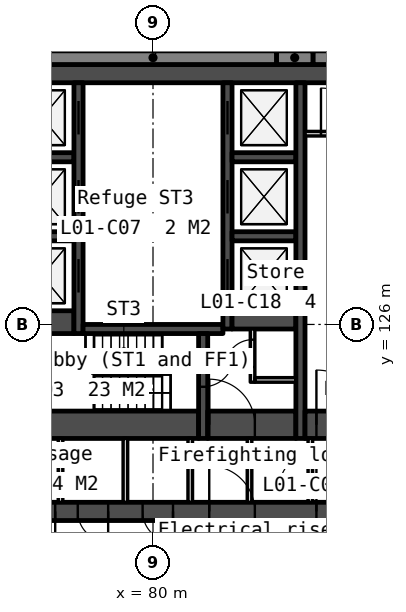
"""IFC4 building model, lengths in metres.
Left out: names, types, materials, properties, quantities, classifications, styles, units other than length and angle.
Written with IfcOpenShell. Run it as: python <this file> out.ifc"""

import sys

from ifc_helpers import new_model, si_unit, direction, frame, frame_2d, origin, place, context, subcontext, project, spatial, rectangle, extrude, element, fill, save


model = new_model("IFC4")
c1 = context("Model", 3, precision=1e-05, world=origin(), true_north=direction((0.0, 1.0)))
c2 = subcontext(c1, "Body", "Model", "MODEL_VIEW")
j1 = project(units=[si_unit("LENGTHUNIT", "METRE"), si_unit("PLANEANGLEUNIT", "RADIAN")], contexts=[c1])
p1 = place(None, origin())
s1 = spatial("IfcSite", under=j1, at=p1, CompositionType="ELEMENT")
p2 = place(p1, origin())
s2 = spatial("IfcBuilding", under=s1, at=p2, CompositionType="ELEMENT")
p3 = place(p2, frame((0.0, 0.0, 7.5)))
s3 = spatial("IfcBuildingStorey", under=s2, at=p3, CompositionType="ELEMENT", Elevation=7.5)
p4 = place(p3, frame((66.0, 134.25, 0.0), z_axis=(0.0, 0.0, 1.0), x_axis=(1.0, 0.0, 0.0)))
e1 = element("IfcWall", 1, at=p4, inside=s3, PredefinedType="SOLIDWALL", context=c2, shape_type="SweptSolid", body=[
    extrude(rectangle(XDim=28.0, YDim=0.6, at=frame_2d((14.0, 0.0))), origin(), (0.0, 0.0, 1.0), 5.7),
])
p5 = place(p3, frame((66.0, 119.85, 0.0), z_axis=(0.0, 0.0, 1.0), x_axis=(1.0, 0.0, 0.0)))
e2 = element("IfcWall", 2, at=p5, inside=s3, PredefinedType="SOLIDWALL", context=c2, shape_type="SweptSolid", body=[
    extrude(rectangle(XDim=28.0, YDim=0.6, at=frame_2d((14.0, 0.0))), origin(), (0.0, 0.0, 1.0), 5.7),
])
p6 = place(p5, frame((6.825, 0.0, 0.0)))
e3 = element("IfcOpeningElement", 3, at=p6, cuts=e2, PredefinedType="OPENING", context=c2, shape_type="SweptSolid", body=[
    extrude(rectangle(XDim=1.8, YDim=2.1, at=frame_2d((0.9, 1.05))), frame((0.0, 0.31, 0.0), z_axis=(0.0, -1.0, 0.0), x_axis=(1.0, 0.0, 0.0)), (0.0, 0.0, 1.0), 0.62),
])
p7 = place(p5, frame((15.85, 0.0, 0.0)))
e4 = element("IfcOpeningElement", 4, at=p7, cuts=e2, PredefinedType="OPENING", context=c2, shape_type="SweptSolid", body=[
    extrude(rectangle(XDim=1.5, YDim=2.1, at=frame_2d((0.75, 1.05))), frame((0.0, 0.31, 0.0), z_axis=(0.0, -1.0, 0.0), x_axis=(1.0, 0.0, 0.0)), (0.0, 0.0, 1.0), 0.62),
])
p8 = place(p5, frame((19.375, 0.0, 0.0)))
e5 = element("IfcOpeningElement", 5, at=p8, cuts=e2, PredefinedType="OPENING", context=c2, shape_type="SweptSolid", body=[
    extrude(rectangle(XDim=1.8, YDim=2.1, at=frame_2d((0.9, 1.05))), frame((0.0, 0.31, 0.0), z_axis=(0.0, -1.0, 0.0), x_axis=(1.0, 0.0, 0.0)), (0.0, 0.0, 1.0), 0.62),
])
p9 = place(p5, frame((4.425, 0.0, 0.0)))
e6 = element("IfcOpeningElement", 6, at=p9, cuts=e2, PredefinedType="OPENING", context=c2, shape_type="SweptSolid", body=[
    extrude(rectangle(XDim=1.0, YDim=2.1, at=frame_2d((0.5, 1.05))), frame((0.0, 0.31, 0.0), z_axis=(0.0, -1.0, 0.0), x_axis=(1.0, 0.0, 0.0)), (0.0, 0.0, 1.0), 0.62),
])
p10 = place(p5, frame((9.783, 0.0, 0.0)))
e7 = element("IfcOpeningElement", 7, at=p10, cuts=e2, PredefinedType="OPENING", context=c2, shape_type="SweptSolid", body=[
    extrude(rectangle(XDim=1.0, YDim=2.1, at=frame_2d((0.5, 1.05))), frame((0.0, 0.31, 0.0), z_axis=(0.0, -1.0, 0.0), x_axis=(1.0, 0.0, 0.0)), (0.0, 0.0, 1.0), 0.62),
])
p11 = place(p5, frame((11.525, 0.0, 0.0)))
e8 = element("IfcOpeningElement", 8, at=p11, cuts=e2, PredefinedType="OPENING", context=c2, shape_type="SweptSolid", body=[
    extrude(rectangle(XDim=1.0, YDim=2.1, at=frame_2d((0.5, 1.05))), frame((0.0, 0.31, 0.0), z_axis=(0.0, -1.0, 0.0), x_axis=(1.0, 0.0, 0.0)), (0.0, 0.0, 1.0), 0.62),
])
p12 = place(p5, frame((13.658, 0.0, 0.0)))
e9 = element("IfcOpeningElement", 9, at=p12, cuts=e2, PredefinedType="OPENING", context=c2, shape_type="SweptSolid", body=[
    extrude(rectangle(XDim=1.0, YDim=2.1, at=frame_2d((0.5, 1.05))), frame((0.0, 0.31, 0.0), z_axis=(0.0, -1.0, 0.0), x_axis=(1.0, 0.0, 0.0)), (0.0, 0.0, 1.0), 0.62),
])
p13 = place(p5, frame((21.725, 0.0, 0.0)))
e10 = element("IfcOpeningElement", 10, at=p13, cuts=e2, PredefinedType="OPENING", context=c2, shape_type="SweptSolid", body=[
    extrude(rectangle(XDim=1.0, YDim=2.1, at=frame_2d((0.5, 1.05))), frame((0.0, 0.31, 0.0), z_axis=(0.0, -1.0, 0.0), x_axis=(1.0, 0.0, 0.0)), (0.0, 0.0, 1.0), 0.62),
])
p14 = place(p5, frame((23.425, 0.0, 0.0)))
e11 = element("IfcOpeningElement", 11, at=p14, cuts=e2, PredefinedType="OPENING", context=c2, shape_type="SweptSolid", body=[
    extrude(rectangle(XDim=1.0, YDim=2.1, at=frame_2d((0.5, 1.05))), frame((0.0, 0.31, 0.0), z_axis=(0.0, -1.0, 0.0), x_axis=(1.0, 0.0, 0.0)), (0.0, 0.0, 1.0), 0.62),
])
for number, where, z_axis, x_axis in (
    (12, (75.3, 131.5, 0.0), (0.0, 0.0, 1.0), (1.0, 0.0, 0.0)),
    (13, (75.3, 128.9, 0.0), (0.0, 0.0, 1.0), (1.0, 0.0, 0.0)),
):
    element("IfcWall", number, at=place(p3, frame(where, z_axis=z_axis, x_axis=x_axis)), inside=s3, PredefinedType="SOLIDWALL", context=c2, shape_type="SweptSolid", body=[
        extrude(rectangle(XDim=2.1, YDim=0.3, at=frame_2d((1.05, 0.0))), origin(), (0.0, 0.0, 1.0), 5.7),
    ])
p15 = place(p3, frame((75.3, 126.075, 0.0), z_axis=(0.0, 0.0, 1.0), x_axis=(1.0, 0.0, 0.0)))
e14 = element("IfcWall", 14, at=p15, inside=s3, PredefinedType="SOLIDWALL", context=c2, shape_type="SweptSolid", body=[
    extrude(rectangle(XDim=2.1, YDim=0.75, at=frame_2d((1.05, 0.0))), origin(), (0.0, 0.0, 1.0), 5.7),
])
p16 = place(p3, frame((75.3, 122.7, 0.0), z_axis=(0.0, 0.0, 1.0), x_axis=(1.0, 0.0, 0.0)))
e15 = element("IfcWall", 15, at=p16, inside=s3, PredefinedType="SOLIDWALL", context=c2, shape_type="SweptSolid", body=[
    extrude(rectangle(XDim=6.2, YDim=0.9, at=frame_2d((3.1, 0.0))), origin(), (0.0, 0.0, 1.0), 5.7),
])
p17 = place(p3, frame((76.958, 122.25, 0.0), z_axis=(0.0, 0.0, 1.0), x_axis=(0.0, -1.0, 0.0)))
e16 = element("IfcWall", 16, at=p17, inside=s3, PredefinedType="PARTITIONING", context=c2, shape_type="SweptSolid", body=[
    extrude(rectangle(XDim=2.1, YDim=0.15, at=frame_2d((1.05, 0.0))), origin(), (0.0, 0.0, 1.0), 5.7),
])
p18 = place(p3, frame((77.55, 133.95, 0.0), z_axis=(0.0, 0.0, 1.0), x_axis=(0.0, -1.0, 0.0)))
e17 = element("IfcWall", 17, at=p18, inside=s3, PredefinedType="SOLIDWALL", context=c2, shape_type="SweptSolid", body=[
    extrude(rectangle(XDim=8.25, YDim=0.3, at=frame_2d((4.125, 0.0))), origin(), (0.0, 0.0, 1.0), 5.7),
])
p19 = place(p18, frame((0.6, 0.0, 0.0)))
e18 = element("IfcOpeningElement", 18, at=p19, cuts=e17, PredefinedType="OPENING", context=c2, shape_type="SweptSolid", body=[
    extrude(rectangle(XDim=1.1, YDim=2.1, at=frame_2d((0.55, 1.05))), frame((0.0, 0.16, 0.0), z_axis=(0.0, -1.0, 0.0), x_axis=(1.0, 0.0, 0.0)), (0.0, 0.0, 1.0), 0.32),
])
p20 = place(p18, frame((3.2, 0.0, 0.0)))
e19 = element("IfcOpeningElement", 19, at=p20, cuts=e17, PredefinedType="OPENING", context=c2, shape_type="SweptSolid", body=[
    extrude(rectangle(XDim=1.1, YDim=2.1, at=frame_2d((0.55, 1.05))), frame((0.0, 0.16, 0.0), z_axis=(0.0, -1.0, 0.0), x_axis=(1.0, 0.0, 0.0)), (0.0, 0.0, 1.0), 0.32),
])
p21 = place(p18, frame((5.8, 0.0, 0.0)))
e20 = element("IfcOpeningElement", 20, at=p21, cuts=e17, PredefinedType="OPENING", context=c2, shape_type="SweptSolid", body=[
    extrude(rectangle(XDim=1.1, YDim=2.1, at=frame_2d((0.55, 1.05))), frame((0.0, 0.16, 0.0), z_axis=(0.0, -1.0, 0.0), x_axis=(1.0, 0.0, 0.0)), (0.0, 0.0, 1.0), 0.32),
])
p22 = place(p3, frame((77.7, 125.85, 0.0), z_axis=(0.0, 0.0, 1.0), x_axis=(1.0, 0.0, 0.0)))
e21 = element("IfcWall", 21, at=p22, inside=s3, PredefinedType="SOLIDWALL", context=c2, shape_type="SweptSolid", body=[
    extrude(rectangle(XDim=4.6, YDim=0.3, at=frame_2d((2.3, 0.0))), origin(), (0.0, 0.0, 1.0), 5.7),
])
for number, where, z_axis, x_axis in (
    (22, (79.092, 122.25, 0.0), (0.0, 0.0, 1.0), (0.0, -1.0, 0.0)),
    (23, (81.225, 122.25, 0.0), (0.0, 0.0, 1.0), (0.0, -1.0, 0.0)),
):
    element("IfcWall", number, at=place(p3, frame(where, z_axis=z_axis, x_axis=x_axis)), inside=s3, PredefinedType="PARTITIONING", context=c2, shape_type="SweptSolid", body=[
        extrude(rectangle(XDim=2.1, YDim=0.15, at=frame_2d((1.05, 0.0))), origin(), (0.0, 0.0, 1.0), 5.7),
    ])
p23 = place(p3, frame((81.65, 125.7, 0.0), z_axis=(0.0, 0.0, 1.0), x_axis=(0.0, -1.0, 0.0)))
e24 = element("IfcWall", 24, at=p23, inside=s3, PredefinedType="SOLIDWALL", context=c2, shape_type="SweptSolid", body=[
    extrude(rectangle(XDim=3.45, YDim=0.3, at=frame_2d((1.725, 0.0))), origin(), (0.0, 0.0, 1.0), 5.7),
])
p24 = place(p23, frame((0.75, 0.0, 0.0)))
e25 = element("IfcOpeningElement", 25, at=p24, cuts=e24, PredefinedType="OPENING", context=c2, shape_type="SweptSolid", body=[
    extrude(rectangle(XDim=1.0, YDim=2.1, at=frame_2d((0.5, 1.05))), frame((0.0, 0.16, 0.0), z_axis=(0.0, -1.0, 0.0), x_axis=(1.0, 0.0, 0.0)), (0.0, 0.0, 1.0), 0.32),
])
p25 = place(p3, frame((81.8, 122.7, 0.0), z_axis=(0.0, 0.0, 1.0), x_axis=(1.0, 0.0, 0.0)))
e26 = element("IfcWall", 26, at=p25, inside=s3, PredefinedType="SOLIDWALL", context=c2, shape_type="SweptSolid", body=[
    extrude(rectangle(XDim=2.9, YDim=0.9, at=frame_2d((1.45, 0.0))), origin(), (0.0, 0.0, 1.0), 5.7),
])
p26 = place(p25, frame((0.05, 0.0, 0.0)))
e27 = element("IfcOpeningElement", 27, at=p26, cuts=e26, PredefinedType="OPENING", context=c2, shape_type="SweptSolid", body=[
    extrude(rectangle(XDim=1.5, YDim=2.1, at=frame_2d((0.75, 1.05))), frame((0.0, 0.46, 0.0), z_axis=(0.0, -1.0, 0.0), x_axis=(1.0, 0.0, 0.0)), (0.0, 0.0, 1.0), 0.92),
])
p27 = place(p3, frame((82.45, 133.95, 0.0), z_axis=(0.0, 0.0, 1.0), x_axis=(0.0, -1.0, 0.0)))
e28 = element("IfcWall", 28, at=p27, inside=s3, PredefinedType="SOLIDWALL", context=c2, shape_type="SweptSolid", body=[
    extrude(rectangle(XDim=8.1, YDim=0.3, at=frame_2d((4.05, 0.0))), origin(), (0.0, 0.0, 1.0), 5.7),
])
p28 = place(p27, frame((0.6, 0.0, 0.0)))
e29 = element("IfcOpeningElement", 29, at=p28, cuts=e28, PredefinedType="OPENING", context=c2, shape_type="SweptSolid", body=[
    extrude(rectangle(XDim=1.1, YDim=2.1, at=frame_2d((0.55, 1.05))), frame((0.0, 0.16, 0.0), z_axis=(0.0, -1.0, 0.0), x_axis=(1.0, 0.0, 0.0)), (0.0, 0.0, 1.0), 0.32),
])
p29 = place(p27, frame((3.2, 0.0, 0.0)))
e30 = element("IfcOpeningElement", 30, at=p29, cuts=e28, PredefinedType="OPENING", context=c2, shape_type="SweptSolid", body=[
    extrude(rectangle(XDim=1.1, YDim=2.1, at=frame_2d((0.55, 1.05))), frame((0.0, 0.16, 0.0), z_axis=(0.0, -1.0, 0.0), x_axis=(1.0, 0.0, 0.0)), (0.0, 0.0, 1.0), 0.32),
])
p30 = place(p27, frame((5.8, 0.0, 0.0)))
e31 = element("IfcOpeningElement", 31, at=p30, cuts=e28, PredefinedType="OPENING", context=c2, shape_type="SweptSolid", body=[
    extrude(rectangle(XDim=1.1, YDim=2.1, at=frame_2d((0.55, 1.05))), frame((0.0, 0.16, 0.0), z_axis=(0.0, -1.0, 0.0), x_axis=(1.0, 0.0, 0.0)), (0.0, 0.0, 1.0), 0.32),
])
for number, where, z_axis, x_axis in (
    (32, (82.6, 131.5, 0.0), (0.0, 0.0, 1.0), (1.0, 0.0, 0.0)),
    (33, (82.6, 128.9, 0.0), (0.0, 0.0, 1.0), (1.0, 0.0, 0.0)),
):
    element("IfcWall", number, at=place(p3, frame(where, z_axis=z_axis, x_axis=x_axis)), inside=s3, PredefinedType="SOLIDWALL", context=c2, shape_type="SweptSolid", body=[
        extrude(rectangle(XDim=2.1, YDim=0.3, at=frame_2d((1.05, 0.0))), origin(), (0.0, 0.0, 1.0), 5.7),
    ])
p31 = place(p3, frame((82.6, 126.15, 0.0), z_axis=(0.0, 0.0, 1.0), x_axis=(1.0, 0.0, 0.0)))
e34 = element("IfcWall", 34, at=p31, inside=s3, PredefinedType="SOLIDWALL", context=c2, shape_type="SweptSolid", body=[
    extrude(rectangle(XDim=2.1, YDim=0.6, at=frame_2d((1.05, 0.0))), origin(), (0.0, 0.0, 1.0), 5.7),
])
p32 = place(p3, frame((83.175, 122.25, 0.0), z_axis=(0.0, 0.0, 1.0), x_axis=(0.0, -1.0, 0.0)))
e35 = element("IfcWall", 35, at=p32, inside=s3, PredefinedType="PARTITIONING", context=c2, shape_type="SweptSolid", body=[
    extrude(rectangle(XDim=2.1, YDim=0.15, at=frame_2d((1.05, 0.0))), origin(), (0.0, 0.0, 1.0), 5.7),
])
p33 = place(p3, frame((83.275, 125.85, 0.0), z_axis=(0.0, 0.0, 1.0), x_axis=(0.0, -1.0, 0.0)))
e36 = element("IfcWall", 36, at=p33, inside=s3, PredefinedType="PARTITIONING", context=c2, shape_type="SweptSolid", body=[
    extrude(rectangle(XDim=1.75, YDim=0.15, at=frame_2d((0.875, 0.0))), origin(), (0.0, 0.0, 1.0), 5.7),
])
p34 = place(p33, frame((0.35, 0.0, 0.0)))
e37 = element("IfcOpeningElement", 37, at=p34, cuts=e36, PredefinedType="OPENING", context=c2, shape_type="SweptSolid", body=[
    extrude(rectangle(XDim=0.9, YDim=2.1, at=frame_2d((0.45, 1.05))), frame((0.0, 0.085, 0.0), z_axis=(0.0, -1.0, 0.0), x_axis=(1.0, 0.0, 0.0)), (0.0, 0.0, 1.0), 0.17),
])
p35 = place(p3, frame((83.35, 124.175, 0.0), z_axis=(0.0, 0.0, 1.0), x_axis=(1.0, 0.0, 0.0)))
e38 = element("IfcWall", 38, at=p35, inside=s3, PredefinedType="PARTITIONING", context=c2, shape_type="SweptSolid", body=[
    extrude(rectangle(XDim=1.35, YDim=0.15, at=frame_2d((0.675, 0.0))), origin(), (0.0, 0.0, 1.0), 5.7),
])
p36 = place(p3, frame((84.85, 133.95, 0.0), z_axis=(0.0, 0.0, 1.0), x_axis=(0.0, -1.0, 0.0)))
e39 = element("IfcWall", 39, at=p36, inside=s3, PredefinedType="SOLIDWALL", context=c2, shape_type="SweptSolid", body=[
    extrude(rectangle(XDim=11.7, YDim=0.3, at=frame_2d((5.85, 0.0))), origin(), (0.0, 0.0, 1.0), 5.7),
])
p37 = place(p3, frame((85.0, 132.275, 0.0), z_axis=(0.0, 0.0, 1.0), x_axis=(1.0, 0.0, 0.0)))
e40 = element("IfcWall", 40, at=p37, inside=s3, PredefinedType="PARTITIONING", context=c2, shape_type="SweptSolid", body=[
    extrude(rectangle(XDim=2.55, YDim=0.15, at=frame_2d((1.275, 0.0))), origin(), (0.0, 0.0, 1.0), 5.7),
])
p38 = place(p37, frame((0.525, 0.0, 0.0)))
e41 = element("IfcOpeningElement", 41, at=p38, cuts=e40, PredefinedType="OPENING", context=c2, shape_type="SweptSolid", body=[
    extrude(rectangle(XDim=1.5, YDim=2.1, at=frame_2d((0.75, 1.05))), frame((0.0, 0.085, 0.0), z_axis=(0.0, -1.0, 0.0), x_axis=(1.0, 0.0, 0.0)), (0.0, 0.0, 1.0), 0.17),
])
p39 = place(p3, frame((85.0, 122.7, 0.0), z_axis=(0.0, 0.0, 1.0), x_axis=(1.0, 0.0, 0.0)))
e42 = element("IfcWall", 42, at=p39, inside=s3, PredefinedType="SOLIDWALL", context=c2, shape_type="SweptSolid", body=[
    extrude(rectangle(XDim=2.55, YDim=0.9, at=frame_2d((1.275, 0.0))), origin(), (0.0, 0.0, 1.0), 5.7),
])
p40 = place(p39, frame((0.375, 0.0, 0.0)))
e43 = element("IfcOpeningElement", 43, at=p40, cuts=e42, PredefinedType="OPENING", context=c2, shape_type="SweptSolid", body=[
    extrude(rectangle(XDim=1.8, YDim=2.1, at=frame_2d((0.9, 1.05))), frame((0.0, 0.46, 0.0), z_axis=(0.0, -1.0, 0.0), x_axis=(1.0, 0.0, 0.0)), (0.0, 0.0, 1.0), 0.92),
])
p41 = place(p3, frame((85.175, 122.25, 0.0), z_axis=(0.0, 0.0, 1.0), x_axis=(0.0, -1.0, 0.0)))
e44 = element("IfcWall", 44, at=p41, inside=s3, PredefinedType="PARTITIONING", context=c2, shape_type="SweptSolid", body=[
    extrude(rectangle(XDim=2.1, YDim=0.15, at=frame_2d((1.05, 0.0))), origin(), (0.0, 0.0, 1.0), 5.7),
])
p42 = place(p41, frame((0.55, 0.0, 0.0)))
e45 = element("IfcOpeningElement", 45, at=p42, cuts=e44, PredefinedType="OPENING", context=c2, shape_type="SweptSolid", body=[
    extrude(rectangle(XDim=1.0, YDim=2.1, at=frame_2d((0.5, 1.05))), frame((0.0, 0.085, 0.0), z_axis=(0.0, -1.0, 0.0), x_axis=(1.0, 0.0, 0.0)), (0.0, 0.0, 1.0), 0.17),
])
p43 = place(p3, frame((93.382, 134.775, -0.3), z_axis=(0.0, 0.0, 1.0), x_axis=(-1.0, 0.0, 0.0)))
e46 = element("IfcWall", 46, at=p43, inside=s3, PredefinedType="SOLIDWALL", context=c2, shape_type="SweptSolid", body=[
    extrude(rectangle(XDim=8.121, YDim=0.45, at=frame_2d((4.061, 0.0))), origin(), (0.0, 0.0, 1.0), 5.312),
])
p44 = place(p3, frame((85.261, 134.775, -0.3), z_axis=(0.0, 0.0, 1.0), x_axis=(-1.0, 0.0, 0.0)))
e47 = element("IfcWall", 47, at=p44, inside=s3, PredefinedType="SOLIDWALL", context=c2, shape_type="SweptSolid", body=[
    extrude(rectangle(XDim=1.2, YDim=0.45, at=frame_2d((0.6, 0.0))), origin(), (0.0, 0.0, 1.0), 5.312),
])
p45 = place(p3, frame((84.061, 134.775, -0.3), z_axis=(0.0, 0.0, 1.0), x_axis=(-1.0, 0.0, 0.0)))
e48 = element("IfcWall", 48, at=p45, inside=s3, PredefinedType="SOLIDWALL", context=c2, shape_type="SweptSolid", body=[
    extrude(rectangle(XDim=8.122, YDim=0.45, at=frame_2d((4.061, 0.0))), origin(), (0.0, 0.0, 1.0), 5.312),
])
p46 = place(p19, origin())
e49 = element("IfcDoor", 49, at=p46, inside=s3, OperationType="SLIDING_TO_RIGHT", PredefinedType="DOOR", context=c2, shape_type="SweptSolid", body=[
    extrude(rectangle(XDim=1.1, YDim=2.1, at=frame_2d((0.55, 1.05))), frame((0.0, 0.025, 0.0), z_axis=(0.0, -1.0, 0.0), x_axis=(1.0, 0.0, 0.0)), (0.0, 0.0, 1.0), 0.05),
])
fill(e18, e49)
p47 = place(p20, origin())
e50 = element("IfcDoor", 50, at=p47, inside=s3, OperationType="SLIDING_TO_RIGHT", PredefinedType="DOOR", context=c2, shape_type="SweptSolid", body=[
    extrude(rectangle(XDim=1.1, YDim=2.1, at=frame_2d((0.55, 1.05))), frame((0.0, 0.025, 0.0), z_axis=(0.0, -1.0, 0.0), x_axis=(1.0, 0.0, 0.0)), (0.0, 0.0, 1.0), 0.05),
])
fill(e19, e50)
p48 = place(p21, origin())
e51 = element("IfcDoor", 51, at=p48, inside=s3, OperationType="SLIDING_TO_RIGHT", PredefinedType="DOOR", context=c2, shape_type="SweptSolid", body=[
    extrude(rectangle(XDim=1.1, YDim=2.1, at=frame_2d((0.55, 1.05))), frame((0.0, 0.025, 0.0), z_axis=(0.0, -1.0, 0.0), x_axis=(1.0, 0.0, 0.0)), (0.0, 0.0, 1.0), 0.05),
])
fill(e20, e51)
p49 = place(p28, origin())
e52 = element("IfcDoor", 52, at=p49, inside=s3, OperationType="SLIDING_TO_LEFT", PredefinedType="DOOR", context=c2, shape_type="SweptSolid", body=[
    extrude(rectangle(XDim=1.1, YDim=2.1, at=frame_2d((0.55, 1.05))), frame((0.0, 0.025, 0.0), z_axis=(0.0, -1.0, 0.0), x_axis=(1.0, 0.0, 0.0)), (0.0, 0.0, 1.0), 0.05),
])
fill(e29, e52)
p50 = place(p29, origin())
e53 = element("IfcDoor", 53, at=p50, inside=s3, OperationType="SLIDING_TO_LEFT", PredefinedType="DOOR", context=c2, shape_type="SweptSolid", body=[
    extrude(rectangle(XDim=1.1, YDim=2.1, at=frame_2d((0.55, 1.05))), frame((0.0, 0.025, 0.0), z_axis=(0.0, -1.0, 0.0), x_axis=(1.0, 0.0, 0.0)), (0.0, 0.0, 1.0), 0.05),
])
fill(e30, e53)
p51 = place(p30, origin())
e54 = element("IfcDoor", 54, at=p51, inside=s3, OperationType="SLIDING_TO_LEFT", PredefinedType="DOOR", context=c2, shape_type="SweptSolid", body=[
    extrude(rectangle(XDim=1.1, YDim=2.1, at=frame_2d((0.55, 1.05))), frame((0.0, 0.025, 0.0), z_axis=(0.0, -1.0, 0.0), x_axis=(1.0, 0.0, 0.0)), (0.0, 0.0, 1.0), 0.05),
])
fill(e31, e54)
p52 = place(p40, origin())
e55 = element("IfcDoor", 55, at=p52, inside=s3, OperationType="DOUBLE_DOOR_DOUBLE_SWING", PredefinedType="DOOR", context=c2, shape_type="SweptSolid", body=[
    extrude(rectangle(XDim=1.8, YDim=2.1, at=frame_2d((0.9, 1.05))), frame((0.0, 0.025, 0.0), z_axis=(0.0, -1.0, 0.0), x_axis=(1.0, 0.0, 0.0)), (0.0, 0.0, 1.0), 0.05),
])
fill(e43, e55)
p53 = place(p26, origin())
e56 = element("IfcDoor", 56, at=p53, inside=s3, OperationType="DOUBLE_DOOR_DOUBLE_SWING", PredefinedType="DOOR", context=c2, shape_type="SweptSolid", body=[
    extrude(rectangle(XDim=1.5, YDim=2.1, at=frame_2d((0.75, 1.05))), frame((0.0, 0.025, 0.0), z_axis=(0.0, -1.0, 0.0), x_axis=(1.0, 0.0, 0.0)), (0.0, 0.0, 1.0), 0.05),
])
fill(e27, e56)
p54 = place(p7, origin())
e57 = element("IfcDoor", 57, at=p54, inside=s3, OperationType="DOUBLE_DOOR_DOUBLE_SWING", PredefinedType="DOOR", context=c2, shape_type="SweptSolid", body=[
    extrude(rectangle(XDim=1.5, YDim=2.1, at=frame_2d((0.75, 1.05))), frame((0.0, 0.025, 0.0), z_axis=(0.0, -1.0, 0.0), x_axis=(1.0, 0.0, 0.0)), (0.0, 0.0, 1.0), 0.05),
])
fill(e4, e57)
p55 = place(p8, origin())
e58 = element("IfcDoor", 58, at=p55, inside=s3, OperationType="DOUBLE_DOOR_DOUBLE_SWING", PredefinedType="DOOR", context=c2, shape_type="SweptSolid", body=[
    extrude(rectangle(XDim=1.8, YDim=2.1, at=frame_2d((0.9, 1.05))), frame((0.0, 0.025, 0.0), z_axis=(0.0, -1.0, 0.0), x_axis=(1.0, 0.0, 0.0)), (0.0, 0.0, 1.0), 0.05),
])
fill(e5, e58)
p56 = place(p34, origin())
e59 = element("IfcDoor", 59, at=p56, inside=s3, OperationType="SINGLE_SWING_RIGHT", PredefinedType="DOOR", context=c2, shape_type="SweptSolid", body=[
    extrude(rectangle(XDim=0.9, YDim=2.1, at=frame_2d((0.45, 1.05))), frame((0.0, 0.025, 0.0), z_axis=(0.0, -1.0, 0.0), x_axis=(1.0, 0.0, 0.0)), (0.0, 0.0, 1.0), 0.05),
])
fill(e37, e59)
p57 = place(p38, origin())
e60 = element("IfcDoor", 60, at=p57, inside=s3, OperationType="DOUBLE_DOOR_DOUBLE_SWING", PredefinedType="DOOR", context=c2, shape_type="SweptSolid", body=[
    extrude(rectangle(XDim=1.5, YDim=2.1, at=frame_2d((0.75, 1.05))), frame((0.0, 0.025, 0.0), z_axis=(0.0, -1.0, 0.0), x_axis=(1.0, 0.0, 0.0)), (0.0, 0.0, 1.0), 0.05),
])
fill(e41, e60)
p58 = place(p10, origin())
e61 = element("IfcDoor", 61, at=p58, inside=s3, OperationType="SINGLE_SWING_RIGHT", PredefinedType="DOOR", context=c2, shape_type="SweptSolid", body=[
    extrude(rectangle(XDim=1.0, YDim=2.1, at=frame_2d((0.5, 1.05))), frame((0.0, 0.025, 0.0), z_axis=(0.0, -1.0, 0.0), x_axis=(1.0, 0.0, 0.0)), (0.0, 0.0, 1.0), 0.05),
])
fill(e7, e61)
p59 = place(p11, origin())
e62 = element("IfcDoor", 62, at=p59, inside=s3, OperationType="SINGLE_SWING_RIGHT", PredefinedType="DOOR", context=c2, shape_type="SweptSolid", body=[
    extrude(rectangle(XDim=1.0, YDim=2.1, at=frame_2d((0.5, 1.05))), frame((0.0, 0.025, 0.0), z_axis=(0.0, -1.0, 0.0), x_axis=(1.0, 0.0, 0.0)), (0.0, 0.0, 1.0), 0.05),
])
fill(e8, e62)
p60 = place(p12, origin())
e63 = element("IfcDoor", 63, at=p60, inside=s3, OperationType="SINGLE_SWING_RIGHT", PredefinedType="DOOR", context=c2, shape_type="SweptSolid", body=[
    extrude(rectangle(XDim=1.0, YDim=2.1, at=frame_2d((0.5, 1.05))), frame((0.0, 0.025, 0.0), z_axis=(0.0, -1.0, 0.0), x_axis=(1.0, 0.0, 0.0)), (0.0, 0.0, 1.0), 0.05),
])
fill(e9, e63)
p61 = place(p42, origin())
e64 = element("IfcDoor", 64, at=p61, inside=s3, OperationType="SINGLE_SWING_RIGHT", PredefinedType="DOOR", context=c2, shape_type="SweptSolid", body=[
    extrude(rectangle(XDim=1.0, YDim=2.1, at=frame_2d((0.5, 1.05))), frame((0.0, 0.025, 0.0), z_axis=(0.0, -1.0, 0.0), x_axis=(1.0, 0.0, 0.0)), (0.0, 0.0, 1.0), 0.05),
])
fill(e45, e64)
p62 = place(p24, origin())
e65 = element("IfcDoor", 65, at=p62, inside=s3, OperationType="SINGLE_SWING_LEFT", PredefinedType="DOOR", context=c2, shape_type="SweptSolid", body=[
    extrude(rectangle(XDim=1.0, YDim=2.1, at=frame_2d((0.5, 1.05))), frame((0.0, 0.025, 0.0), z_axis=(0.0, -1.0, 0.0), x_axis=(1.0, 0.0, 0.0)), (0.0, 0.0, 1.0), 0.05),
])
fill(e25, e65)
save(model, sys.argv[1])
